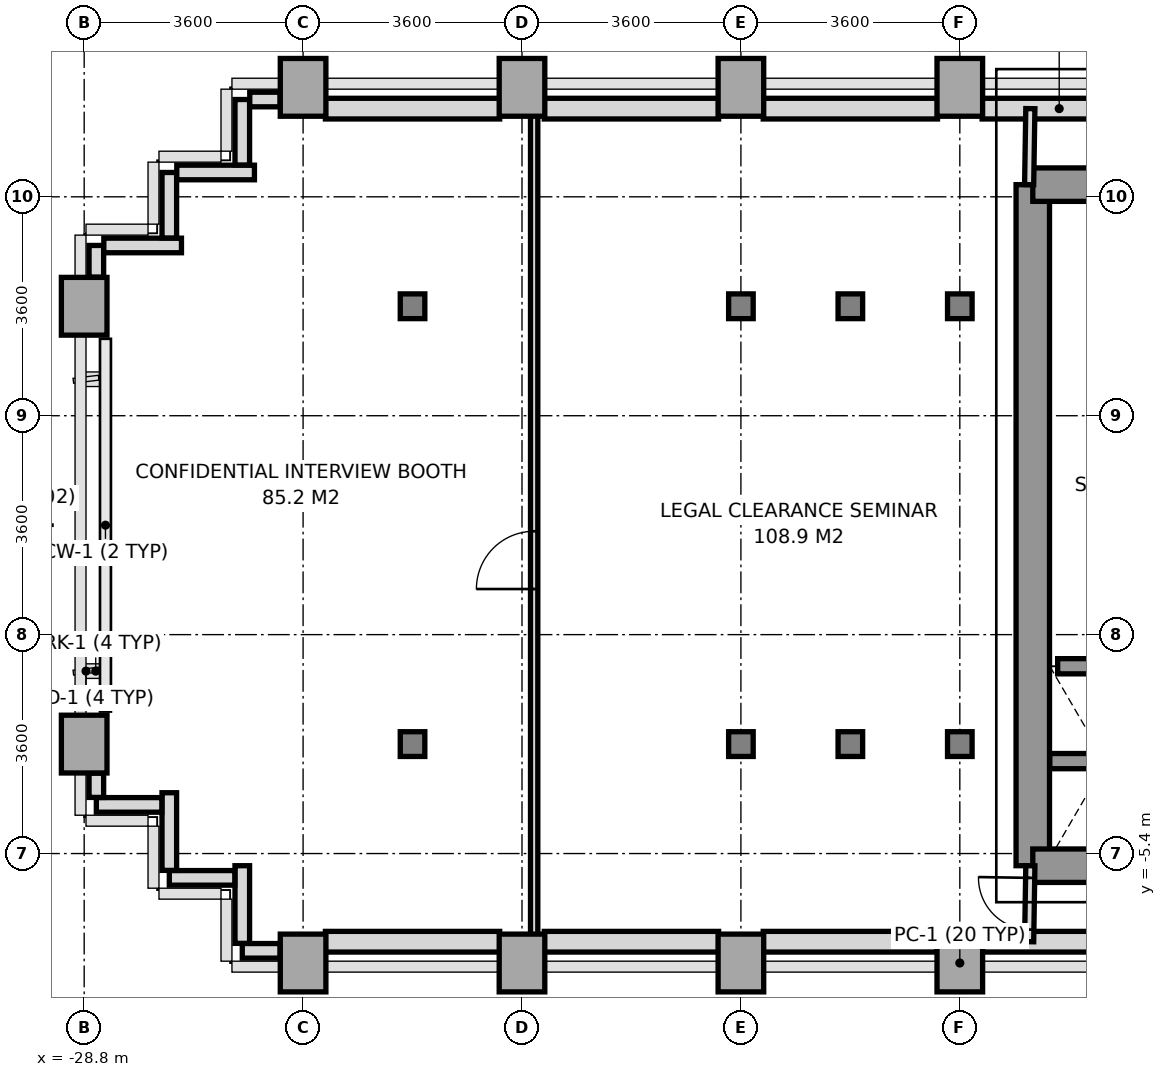
"""IFC4 building model, lengths in metres.
Left out: names, types, materials, properties, quantities, classifications, styles, units other than length and angle.
Written with IfcOpenShell. Run it as: python <this file> out.ifc"""

import sys

from ifc_helpers import new_model, si_unit, direction, frame, frame_2d, origin, origin_2d, place, context, subcontext, project, spatial, rectangle, i_section, extrude, source, transform, mapped, element, fill, save


model = new_model("IFC4")
c1 = context("Model", 3, precision=1e-05, world=origin(), true_north=direction((0.0, 1.0)))
c2 = subcontext(c1, "Body", "Model", "MODEL_VIEW")
j1 = project(units=[si_unit("LENGTHUNIT", "METRE"), si_unit("PLANEANGLEUNIT", "RADIAN")], contexts=[c1])
p1 = place(None, origin())
s1 = spatial("IfcSite", under=j1, at=p1, CompositionType="ELEMENT")
p2 = place(p1, origin())
s2 = spatial("IfcBuilding", under=s1, at=p2, CompositionType="ELEMENT")
p3 = place(p2, frame((0.0, 0.0, 64.6)))
s3 = spatial("IfcBuildingStorey", under=s2, at=p3, CompositionType="ELEMENT", Elevation=64.6)
m1 = source(origin(), c2, "Body", "SweptSolid", [
    extrude(rectangle(XDim=0.75, YDim=0.95, at=origin_2d()), origin(), (0.0, 0.0, 1.0), 3.2),
])
for number, where, z_axis, x_axis in (
    (1, (-28.8, -3.6, 0.0), (0.0, 0.0, 1.0), (1.0, 0.0, 0.0)),
    (2, (-28.8, 3.6, 0.0), (0.0, 0.0, 1.0), (1.0, 0.0, 0.0)),
    (3, (-25.2, -7.2, 0.0), (0.0, 0.0, 1.0), (1.0, 0.0, 0.0)),
    (4, (-25.2, 7.2, 0.0), (0.0, 0.0, 1.0), (1.0, 0.0, 0.0)),
):
    element("IfcColumn", number, at=place(p3, frame(where, z_axis=z_axis, x_axis=x_axis)), inside=s3, PredefinedType="COLUMN", context=c2, shape_type="MappedRepresentation", body=[
        mapped(m1, transform((0.0, 0.0, 0.0), x_axis=(1.0, 0.0, 0.0), y_axis=(0.0, 1.0, 0.0), z_axis=(0.0, 0.0, 1.0), scale=1.0)),
    ])
m2 = source(origin(), c2, "Body", "SweptSolid", [
    extrude(i_section(OverallWidth=0.404, OverallDepth=0.407, WebThickness=0.022, FlangeThickness=0.035, at=origin_2d()), origin(), (0.0, 0.0, 1.0), 3.2),
])
for number, where, z_axis, x_axis in (
    (5, (-23.4, -3.6, 0.0), (0.0, 0.0, 1.0), (1.0, 0.0, 0.0)),
    (6, (-23.4, 3.6, 0.0), (0.0, 0.0, 1.0), (1.0, 0.0, 0.0)),
):
    element("IfcColumn", number, at=place(p3, frame(where, z_axis=z_axis, x_axis=x_axis)), inside=s3, PredefinedType="COLUMN", context=c2, shape_type="MappedRepresentation", body=[
        mapped(m2, transform((0.0, 0.0, 0.0), x_axis=(1.0, 0.0, 0.0), y_axis=(0.0, 1.0, 0.0), z_axis=(0.0, 0.0, 1.0), scale=1.0)),
    ])
for number, where, z_axis, x_axis in (
    (7, (-21.6, -7.2, 0.0), (0.0, 0.0, 1.0), (1.0, 0.0, 0.0)),
    (8, (-21.6, 7.2, 0.0), (0.0, 0.0, 1.0), (1.0, 0.0, 0.0)),
    (9, (-18.0, -7.2, 0.0), (0.0, 0.0, 1.0), (1.0, 0.0, 0.0)),
):
    element("IfcColumn", number, at=place(p3, frame(where, z_axis=z_axis, x_axis=x_axis)), inside=s3, PredefinedType="COLUMN", context=c2, shape_type="MappedRepresentation", body=[
        mapped(m1, transform((0.0, 0.0, 0.0), x_axis=(1.0, 0.0, 0.0), y_axis=(0.0, 1.0, 0.0), z_axis=(0.0, 0.0, 1.0), scale=1.0)),
    ])
for number, where, z_axis, x_axis in (
    (10, (-18.0, -3.6, 0.0), (0.0, 0.0, 1.0), (1.0, 0.0, 0.0)),
    (11, (-18.0, 3.6, 0.0), (0.0, 0.0, 1.0), (1.0, 0.0, 0.0)),
):
    element("IfcColumn", number, at=place(p3, frame(where, z_axis=z_axis, x_axis=x_axis)), inside=s3, PredefinedType="COLUMN", context=c2, shape_type="MappedRepresentation", body=[
        mapped(m2, transform((0.0, 0.0, 0.0), x_axis=(1.0, 0.0, 0.0), y_axis=(0.0, 1.0, 0.0), z_axis=(0.0, 0.0, 1.0), scale=1.0)),
    ])
p4 = place(p3, frame((-18.0, 7.2, 0.0), z_axis=(0.0, 0.0, 1.0), x_axis=(1.0, 0.0, 0.0)))
e12 = element("IfcColumn", 12, at=p4, inside=s3, PredefinedType="COLUMN", context=c2, shape_type="MappedRepresentation", body=[
    mapped(m1, transform((0.0, 0.0, 0.0), x_axis=(1.0, 0.0, 0.0), y_axis=(0.0, 1.0, 0.0), z_axis=(0.0, 0.0, 1.0), scale=1.0)),
])
for number, where, z_axis, x_axis in (
    (13, (-16.2, -3.6, 0.0), (0.0, 0.0, 1.0), (1.0, 0.0, 0.0)),
    (14, (-16.2, 3.6, 0.0), (0.0, 0.0, 1.0), (1.0, 0.0, 0.0)),
):
    element("IfcColumn", number, at=place(p3, frame(where, z_axis=z_axis, x_axis=x_axis)), inside=s3, PredefinedType="COLUMN", context=c2, shape_type="MappedRepresentation", body=[
        mapped(m2, transform((0.0, 0.0, 0.0), x_axis=(1.0, 0.0, 0.0), y_axis=(0.0, 1.0, 0.0), z_axis=(0.0, 0.0, 1.0), scale=1.0)),
    ])
p5 = place(p3, frame((-14.4, -7.2, 0.0), z_axis=(0.0, 0.0, 1.0), x_axis=(1.0, 0.0, 0.0)))
e15 = element("IfcColumn", 15, at=p5, inside=s3, PredefinedType="COLUMN", context=c2, shape_type="MappedRepresentation", body=[
    mapped(m1, transform((0.0, 0.0, 0.0), x_axis=(1.0, 0.0, 0.0), y_axis=(0.0, 1.0, 0.0), z_axis=(0.0, 0.0, 1.0), scale=1.0)),
])
for number, where, z_axis, x_axis in (
    (16, (-14.4, -3.6, 0.0), (0.0, 0.0, 1.0), (1.0, 0.0, 0.0)),
    (17, (-14.4, 3.6, 0.0), (0.0, 0.0, 1.0), (1.0, 0.0, 0.0)),
):
    element("IfcColumn", number, at=place(p3, frame(where, z_axis=z_axis, x_axis=x_axis)), inside=s3, PredefinedType="COLUMN", context=c2, shape_type="MappedRepresentation", body=[
        mapped(m2, transform((0.0, 0.0, 0.0), x_axis=(1.0, 0.0, 0.0), y_axis=(0.0, 1.0, 0.0), z_axis=(0.0, 0.0, 1.0), scale=1.0)),
    ])
p6 = place(p3, frame((-14.4, 7.2, 0.0), z_axis=(0.0, 0.0, 1.0), x_axis=(1.0, 0.0, 0.0)))
e18 = element("IfcColumn", 18, at=p6, inside=s3, PredefinedType="COLUMN", context=c2, shape_type="MappedRepresentation", body=[
    mapped(m1, transform((0.0, 0.0, 0.0), x_axis=(1.0, 0.0, 0.0), y_axis=(0.0, 1.0, 0.0), z_axis=(0.0, 0.0, 1.0), scale=1.0)),
])
for number, where, z_axis, x_axis in (
    (19, (-24.833, 6.85, 0.0), (0.0, 0.0, 1.0), (1.0, 0.0, 0.0)),
    (20, (-21.233, 6.85, 0.0), (0.0, 0.0, 1.0), (1.0, 0.0, 0.0)),
    (21, (-17.633, 6.85, 0.0), (0.0, 0.0, 1.0), (1.0, 0.0, 0.0)),
):
    element("IfcWall", number, at=place(p3, frame(where, z_axis=z_axis, x_axis=x_axis)), inside=s3, PredefinedType="SOLIDWALL", context=c2, shape_type="SweptSolid", body=[
        extrude(rectangle(XDim=2.866, YDim=0.34, at=frame_2d((1.433, 0.0))), origin(), (0.0, 0.0, 1.0), 2.45),
    ])
p7 = place(p3, frame((-14.033, 6.85, 0.0), z_axis=(0.0, 0.0, 1.0), x_axis=(1.0, 0.0, 0.0)))
e22 = element("IfcWall", 22, at=p7, inside=s3, PredefinedType="SOLIDWALL", context=c2, shape_type="SweptSolid", body=[
    extrude(rectangle(XDim=2.535, YDim=0.34, at=frame_2d((1.268, 0.0))), origin(), (0.0, 0.0, 1.0), 3.2),
])
for number, where, z_axis, x_axis in (
    (23, (-24.833, -6.85, 0.0), (0.0, 0.0, 1.0), (1.0, 0.0, 0.0)),
    (24, (-21.233, -6.85, 0.0), (0.0, 0.0, 1.0), (1.0, 0.0, 0.0)),
    (25, (-17.633, -6.85, 0.0), (0.0, 0.0, 1.0), (1.0, 0.0, 0.0)),
):
    element("IfcWall", number, at=place(p3, frame(where, z_axis=z_axis, x_axis=x_axis)), inside=s3, PredefinedType="SOLIDWALL", context=c2, shape_type="SweptSolid", body=[
        extrude(rectangle(XDim=2.866, YDim=0.34, at=frame_2d((1.433, 0.0))), origin(), (0.0, 0.0, 1.0), 2.45),
    ])
p8 = place(p3, frame((-14.033, -6.85, 0.0), z_axis=(0.0, 0.0, 1.0), x_axis=(1.0, 0.0, 0.0)))
e26 = element("IfcWall", 26, at=p8, inside=s3, PredefinedType="SOLIDWALL", context=c2, shape_type="SweptSolid", body=[
    extrude(rectangle(XDim=2.283, YDim=0.34, at=frame_2d((1.142, 0.0))), origin(), (0.0, 0.0, 1.0), 3.2),
])
p9 = place(p3, frame((-25.578, -7.0, 0.0), z_axis=(0.0, 0.0, 1.0), x_axis=(-1.0, 0.0, 0.0)))
e27 = element("IfcWall", 27, at=p9, inside=s3, PredefinedType="PARAPET", context=c2, shape_type="SweptSolid", body=[
    extrude(rectangle(XDim=0.622, YDim=0.24, at=frame_2d((0.311, 0.0))), origin(), (0.0, 0.0, 1.0), 1.15),
])
p10 = place(p3, frame((-26.2, -6.877, 0.0), z_axis=(0.0, 0.0, 1.0), x_axis=(0.0, 1.0, 0.0)))
e28 = element("IfcWall", 28, at=p10, inside=s3, PredefinedType="PARAPET", context=c2, shape_type="SweptSolid", body=[
    extrude(rectangle(XDim=1.277, YDim=0.24, at=frame_2d((0.638, 0.0))), origin(), (0.0, 0.0, 1.0), 1.15),
])
p11 = place(p3, frame((-26.323, -5.8, 0.0), z_axis=(0.0, 0.0, 1.0), x_axis=(-1.0, 0.0, 0.0)))
e29 = element("IfcWall", 29, at=p11, inside=s3, PredefinedType="PARAPET", context=c2, shape_type="SweptSolid", body=[
    extrude(rectangle(XDim=1.077, YDim=0.24, at=frame_2d((0.539, 0.0))), origin(), (0.0, 0.0, 1.0), 1.15),
])
p12 = place(p3, frame((-27.4, -5.677, 0.0), z_axis=(0.0, 0.0, 1.0), x_axis=(0.0, 1.0, 0.0)))
e30 = element("IfcWall", 30, at=p12, inside=s3, PredefinedType="PARAPET", context=c2, shape_type="SweptSolid", body=[
    extrude(rectangle(XDim=1.277, YDim=0.24, at=frame_2d((0.639, 0.0))), origin(), (0.0, 0.0, 1.0), 1.15),
])
p13 = place(p3, frame((-27.523, -4.6, 0.0), z_axis=(0.0, 0.0, 1.0), x_axis=(-1.0, 0.0, 0.0)))
e31 = element("IfcWall", 31, at=p13, inside=s3, PredefinedType="PARAPET", context=c2, shape_type="SweptSolid", body=[
    extrude(rectangle(XDim=1.077, YDim=0.24, at=frame_2d((0.539, 0.0))), origin(), (0.0, 0.0, 1.0), 1.15),
])
p14 = place(p3, frame((-28.6, -4.477, 0.0), z_axis=(0.0, 0.0, 1.0), x_axis=(0.0, 1.0, 0.0)))
e32 = element("IfcWall", 32, at=p14, inside=s3, PredefinedType="PARAPET", context=c2, shape_type="SweptSolid", body=[
    extrude(rectangle(XDim=0.399, YDim=0.24, at=frame_2d((0.2, 0.0))), origin(), (0.0, 0.0, 1.0), 1.15),
])
p15 = place(p3, frame((-28.6, 4.078, 0.0), z_axis=(0.0, 0.0, 1.0), x_axis=(0.0, 1.0, 0.0)))
e33 = element("IfcWall", 33, at=p15, inside=s3, PredefinedType="PARAPET", context=c2, shape_type="SweptSolid", body=[
    extrude(rectangle(XDim=0.522, YDim=0.24, at=frame_2d((0.261, 0.0))), origin(), (0.0, 0.0, 1.0), 1.15),
])
p16 = place(p3, frame((-28.477, 4.6, 0.0), z_axis=(0.0, 0.0, 1.0), x_axis=(1.0, 0.0, 0.0)))
e34 = element("IfcWall", 34, at=p16, inside=s3, PredefinedType="PARAPET", context=c2, shape_type="SweptSolid", body=[
    extrude(rectangle(XDim=1.277, YDim=0.24, at=frame_2d((0.639, 0.0))), origin(), (0.0, 0.0, 1.0), 1.15),
])
p17 = place(p3, frame((-27.4, 4.723, 0.0), z_axis=(0.0, 0.0, 1.0), x_axis=(0.0, 1.0, 0.0)))
e35 = element("IfcWall", 35, at=p17, inside=s3, PredefinedType="PARAPET", context=c2, shape_type="SweptSolid", body=[
    extrude(rectangle(XDim=1.077, YDim=0.24, at=frame_2d((0.539, 0.0))), origin(), (0.0, 0.0, 1.0), 1.15),
])
p18 = place(p3, frame((-27.277, 5.8, 0.0), z_axis=(0.0, 0.0, 1.0), x_axis=(1.0, 0.0, 0.0)))
e36 = element("IfcWall", 36, at=p18, inside=s3, PredefinedType="PARAPET", context=c2, shape_type="SweptSolid", body=[
    extrude(rectangle(XDim=1.277, YDim=0.24, at=frame_2d((0.639, 0.0))), origin(), (0.0, 0.0, 1.0), 1.15),
])
p19 = place(p3, frame((-26.2, 5.923, 0.0), z_axis=(0.0, 0.0, 1.0), x_axis=(0.0, 1.0, 0.0)))
e37 = element("IfcWall", 37, at=p19, inside=s3, PredefinedType="PARAPET", context=c2, shape_type="SweptSolid", body=[
    extrude(rectangle(XDim=1.077, YDim=0.24, at=frame_2d((0.539, 0.0))), origin(), (0.0, 0.0, 1.0), 1.15),
])
p20 = place(p3, frame((-26.077, 7.0, 0.0), z_axis=(0.0, 0.0, 1.0), x_axis=(1.0, 0.0, 0.0)))
e38 = element("IfcWall", 38, at=p20, inside=s3, PredefinedType="PARAPET", context=c2, shape_type="SweptSolid", body=[
    extrude(rectangle(XDim=0.499, YDim=0.24, at=frame_2d((0.25, 0.0))), origin(), (0.0, 0.0, 1.0), 1.15),
])
p21 = place(p3, frame((-13.2, -5.6, 0.0), z_axis=(0.0, 0.0, 1.0), x_axis=(0.0, 1.0, 0.0)))
e39 = element("IfcWall", 39, at=p21, inside=s3, PredefinedType="SHEAR", context=c2, shape_type="SweptSolid", body=[
    extrude(rectangle(XDim=11.2, YDim=0.55, at=frame_2d((5.6, 0.0))), origin(), (0.0, 0.0, 1.0), 3.2),
])
p22 = place(p3, frame((-13.2, 5.6, 0.0), z_axis=(0.0, 0.0, 1.0), x_axis=(1.0, 0.0, 0.0)))
e40 = element("IfcWall", 40, at=p22, inside=s3, PredefinedType="SHEAR", context=c2, shape_type="SweptSolid", body=[
    extrude(rectangle(XDim=1.819, YDim=0.55, at=frame_2d((0.909, 0.0))), origin(), (0.0, 0.0, 1.0), 3.2),
])
p23 = place(p3, frame((-13.2, -5.6, 0.0), z_axis=(0.0, 0.0, 1.0), x_axis=(1.0, 0.0, 0.0)))
e41 = element("IfcWall", 41, at=p23, inside=s3, PredefinedType="SHEAR", context=c2, shape_type="SweptSolid", body=[
    extrude(rectangle(XDim=7.8, YDim=0.55, at=frame_2d((3.9, 0.0))), origin(), (0.0, 0.0, 1.0), 3.2),
])
p24 = place(p23, frame((3.6, 0.0, 0.0)))
e42 = element("IfcOpeningElement", 42, at=p24, cuts=e41, PredefinedType="OPENING", context=c2, shape_type="SweptSolid", body=[
    extrude(rectangle(XDim=1.2, YDim=2.2, at=frame_2d((0.6, 1.1))), frame((0.0, 0.285, 0.0), z_axis=(0.0, -1.0, 0.0), x_axis=(1.0, 0.0, 0.0)), (0.0, 0.0, 1.0), 0.57),
])
p25 = place(p3, frame((-12.92, -3.88, 0.0), z_axis=(0.0, 0.0, 1.0), x_axis=(1.0, 0.0, 0.0)))
e43 = element("IfcWall", 43, at=p25, inside=s3, PredefinedType="SOLIDWALL", context=c2, shape_type="SweptSolid", body=[
    extrude(rectangle(XDim=1.84, YDim=0.25, at=frame_2d((0.92, 0.0))), origin(), (0.0, 0.0, 1.0), 3.2),
])
p26 = place(p3, frame((-12.791, -2.32, 0.0), z_axis=(0.0, 0.0, 1.0), x_axis=(1.0, 0.0, 0.0)))
e44 = element("IfcWall", 44, at=p26, inside=s3, PredefinedType="SOLIDWALL", context=c2, shape_type="SweptSolid", body=[
    extrude(rectangle(XDim=1.582, YDim=0.25, at=frame_2d((0.791, 0.0))), origin(), (0.0, 0.0, 1.0), 3.2),
])
p27 = place(p3, frame((-13.26, 5.6, 0.0), z_axis=(0.0, 0.0, 1.0), x_axis=(0.016013571389, 0.999871774545, 0.0)))
e45 = element("IfcWall", 45, at=p27, inside=s3, PredefinedType="PARTITIONING", context=c2, shape_type="SweptSolid", body=[
    extrude(rectangle(XDim=1.25, YDim=0.15, at=frame_2d((0.625, 0.0))), origin(), (0.0, 0.0, 1.0), 3.2),
])
p28 = place(p3, frame((-13.26, -6.85, 0.0), z_axis=(0.0, 0.0, 1.0), x_axis=(0.016013571389, 0.999871774545, 0.0)))
e46 = element("IfcWall", 46, at=p28, inside=s3, PredefinedType="PARTITIONING", context=c2, shape_type="SweptSolid", body=[
    extrude(rectangle(XDim=1.25, YDim=0.15, at=frame_2d((0.625, 0.0))), origin(), (0.0, 0.0, 1.0), 3.2),
])
p29 = place(p28, frame((0.2, 0.0, 0.0)))
e47 = element("IfcOpeningElement", 47, at=p29, cuts=e46, PredefinedType="OPENING", context=c2, shape_type="SweptSolid", body=[
    extrude(rectangle(XDim=0.85, YDim=2.1, at=frame_2d((0.425, 1.05))), frame((0.0, 0.085, 0.0), z_axis=(0.0, -1.0, 0.0), x_axis=(1.0, 0.0, 0.0)), (0.0, 0.0, 1.0), 0.17),
])
p30 = place(p3, frame((-21.4, -6.85, 0.0), z_axis=(0.0, 0.0, 1.0), x_axis=(0.0, 1.0, 0.0)))
e48 = element("IfcWall", 48, at=p30, inside=s3, PredefinedType="PARTITIONING", context=c2, shape_type="SweptSolid", body=[
    extrude(rectangle(XDim=13.7, YDim=0.12, at=frame_2d((6.85, 0.0))), origin(), (0.0, 0.0, 1.0), 2.65),
])
p31 = place(p30, frame((5.8, 0.0, 0.0)))
e49 = element("IfcOpeningElement", 49, at=p31, cuts=e48, PredefinedType="OPENING", context=c2, shape_type="SweptSolid", body=[
    extrude(rectangle(XDim=0.95, YDim=2.15, at=frame_2d((0.475, 1.075))), frame((0.0, 0.07, 0.0), z_axis=(0.0, -1.0, 0.0), x_axis=(1.0, 0.0, 0.0)), (0.0, 0.0, 1.0), 0.14),
])
m3 = source(origin(), c2, "Body", "SweptSolid", [
    extrude(rectangle(XDim=0.85, YDim=2.1, at=frame_2d((0.425, 1.05))), frame((0.0, 0.025, 0.0), z_axis=(0.0, -1.0, 0.0), x_axis=(1.0, 0.0, 0.0)), (0.0, 0.0, 1.0), 0.05),
])
p32 = place(p29, origin())
e50 = element("IfcDoor", 50, at=p32, inside=s3, OperationType="SINGLE_SWING_RIGHT", PredefinedType="DOOR", context=c2, shape_type="MappedRepresentation", body=[
    mapped(m3, transform((0.0, 0.0, 0.0), x_axis=(1.0, 0.0, 0.0), y_axis=(0.0, 1.0, 0.0), z_axis=(0.0, 0.0, 1.0), scale=1.0)),
])
fill(e47, e50)
m4 = source(origin(), c2, "Body", "SweptSolid", [
    extrude(rectangle(XDim=0.95, YDim=2.15, at=frame_2d((0.475, 1.075))), frame((0.0, 0.025, 0.0), z_axis=(0.0, -1.0, 0.0), x_axis=(1.0, 0.0, 0.0)), (0.0, 0.0, 1.0), 0.05),
])
p33 = place(p31, origin())
e51 = element("IfcDoor", 51, at=p33, inside=s3, OperationType="SINGLE_SWING_LEFT", PredefinedType="DOOR", context=c2, shape_type="MappedRepresentation", body=[
    mapped(m4, transform((0.0, 0.0, 0.0), x_axis=(1.0, 0.0, 0.0), y_axis=(0.0, 1.0, 0.0), z_axis=(0.0, 0.0, 1.0), scale=1.0)),
])
fill(e49, e51)
save(model, sys.argv[1])
